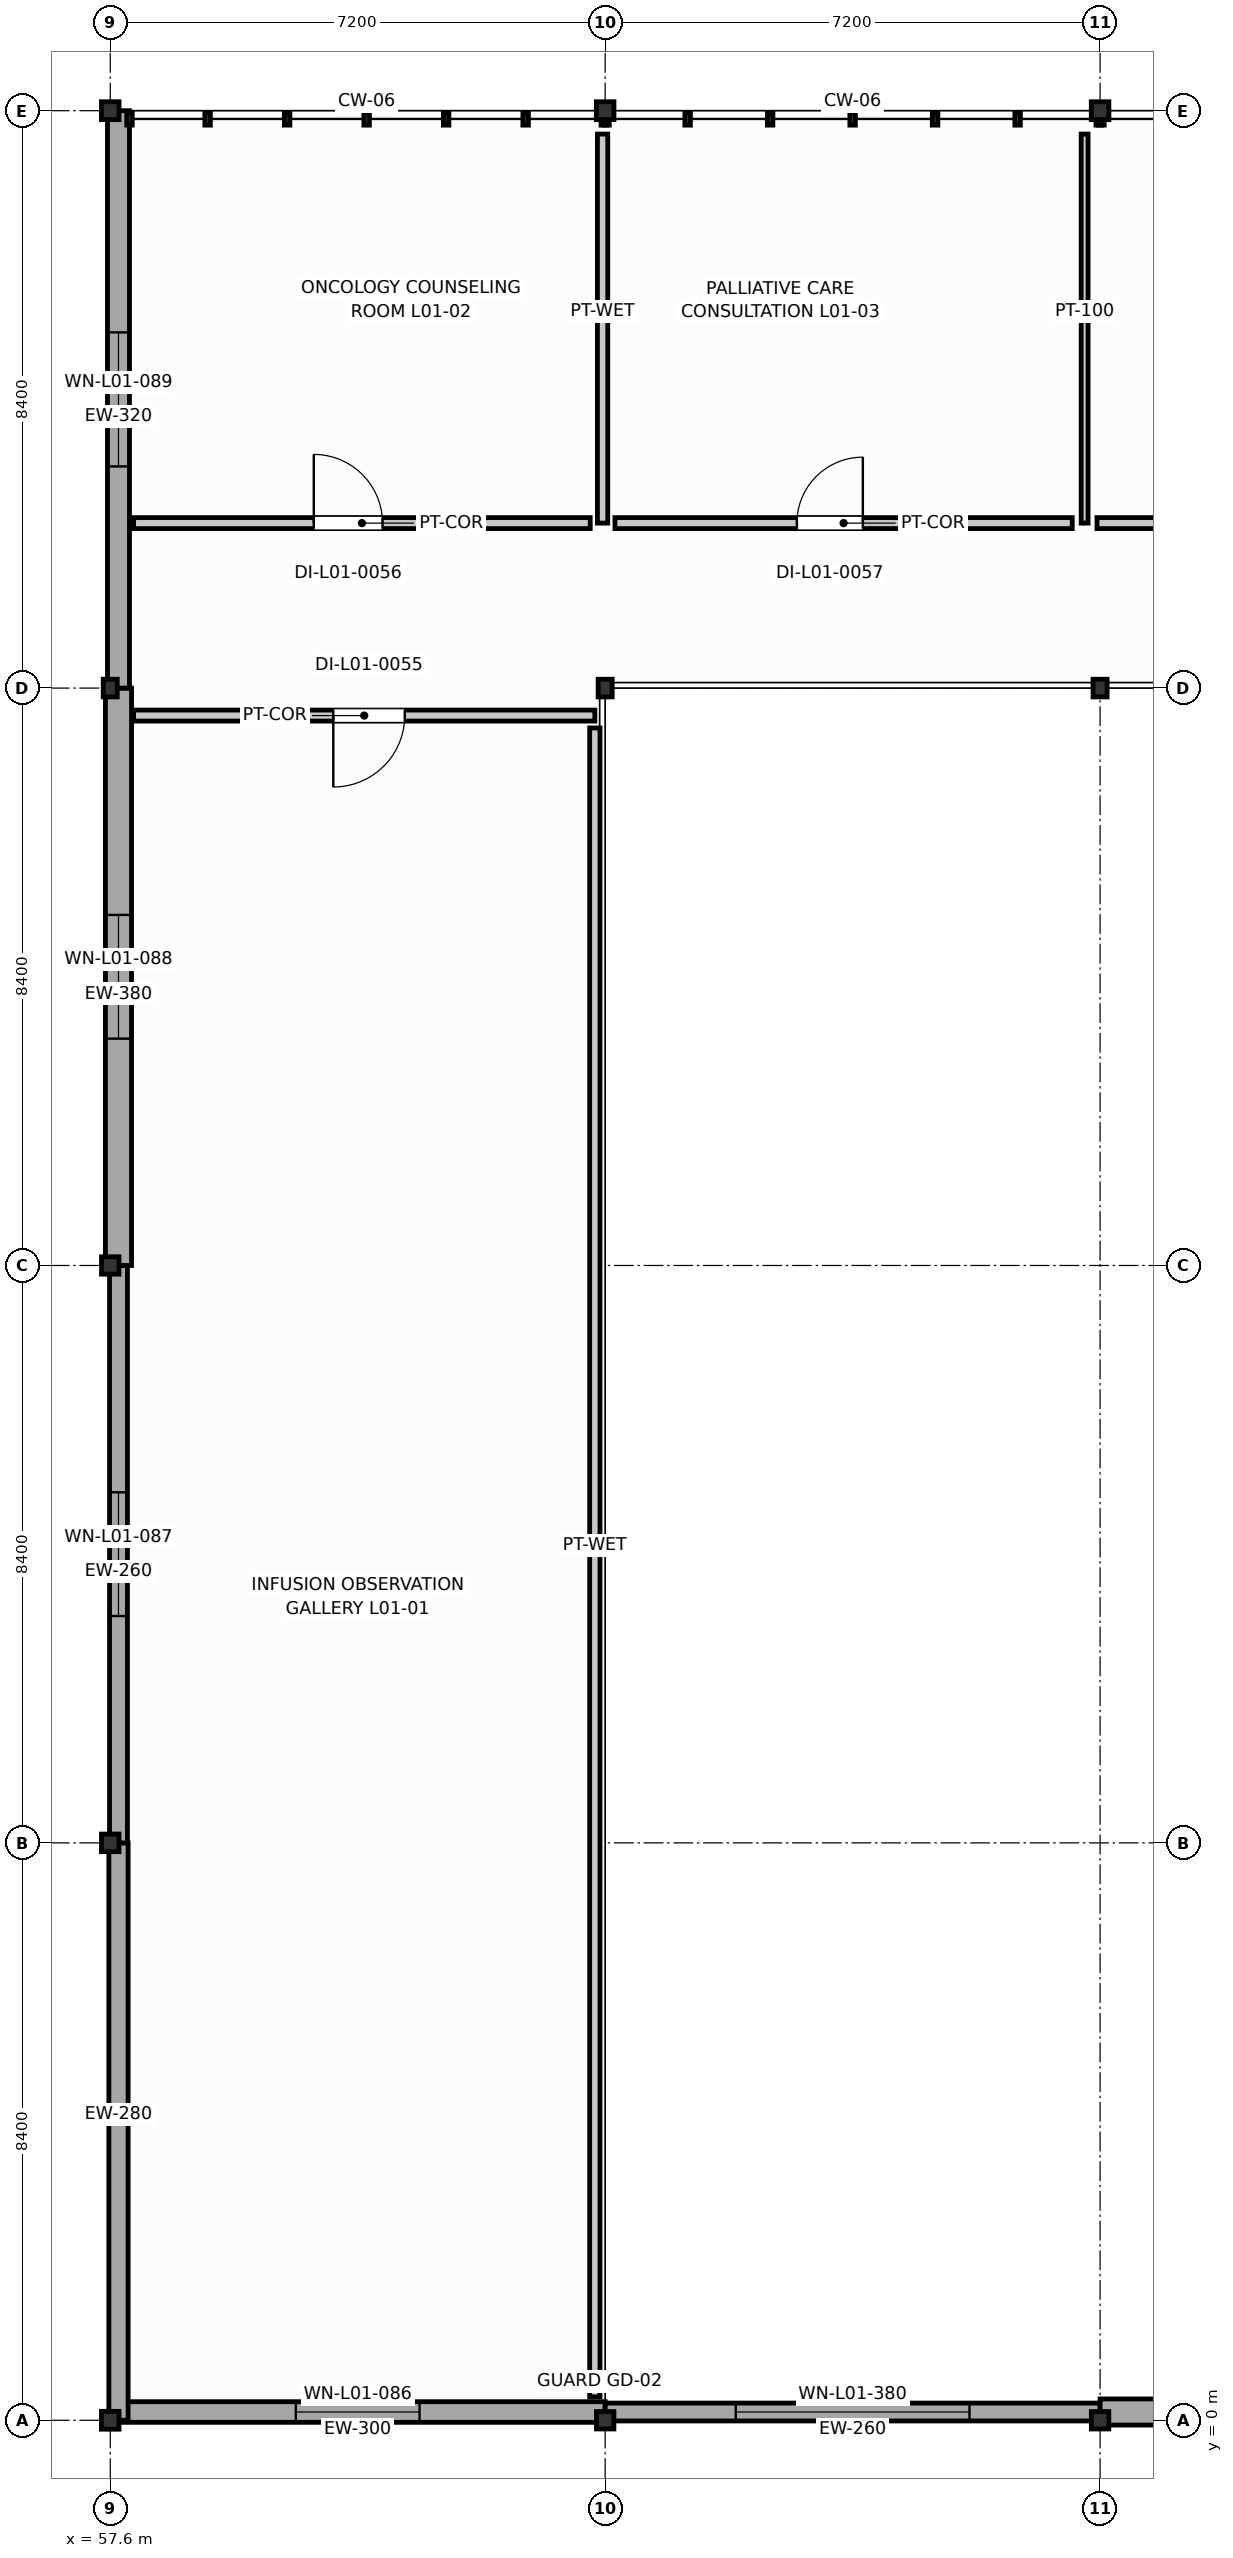
"""IFC4 building model, lengths in metres.
Left out: names, types, materials, properties, quantities, classifications, styles, units other than length and angle.
Written with IfcOpenShell. Run it as: python <this file> out.ifc"""

import sys

from ifc_helpers import new_model, si_unit, direction, frame, frame_2d, origin, origin_2d, place, context, subcontext, project, spatial, rectangle, i_section, extrude, element, fill, save


model = new_model("IFC4")
c1 = context("Model", 3, precision=1e-05, world=origin(), true_north=direction((0.0, 1.0)))
c2 = subcontext(c1, "Body", "Model", "MODEL_VIEW")
j1 = project(units=[si_unit("LENGTHUNIT", "METRE"), si_unit("PLANEANGLEUNIT", "RADIAN")], contexts=[c1])
p1 = place(None, origin())
s1 = spatial("IfcSite", under=j1, at=p1, CompositionType="ELEMENT")
p2 = place(p1, origin())
s2 = spatial("IfcBuilding", under=s1, at=p2, CompositionType="ELEMENT")
p3 = place(p2, frame((0.0, 0.0, 4.8)))
s3 = spatial("IfcBuildingStorey", under=s2, at=p3, CompositionType="ELEMENT", Elevation=4.8)
p4 = place(p3, frame((57.6, 0.0, 0.0), z_axis=(0.0, 0.0, 1.0), x_axis=(1.0, 0.0, 0.0)))
e1 = element("IfcColumn", 1, at=p4, inside=s3, PredefinedType="COLUMN", context=c2, shape_type="SweptSolid", body=[
    extrude(i_section(OverallWidth=0.256, OverallDepth=0.26, WebThickness=0.011, FlangeThickness=0.017, FilletRadius=0.013, at=origin_2d()), origin(), (0.0, 0.0, 1.0), 4.2),
])
p5 = place(p3, frame((57.6, 8.4, 0.0), z_axis=(0.0, 0.0, 1.0), x_axis=(1.0, 0.0, 0.0)))
e2 = element("IfcColumn", 2, at=p5, inside=s3, PredefinedType="COLUMN", context=c2, shape_type="SweptSolid", body=[
    extrude(i_section(OverallWidth=0.255, OverallDepth=0.256, WebThickness=0.01, FlangeThickness=0.016, FilletRadius=0.013, at=origin_2d()), origin(), (0.0, 0.0, 1.0), 4.2),
])
p6 = place(p3, frame((57.6, 16.8, 0.0), z_axis=(0.0, 0.0, 1.0), x_axis=(1.0, 0.0, 0.0)))
e3 = element("IfcColumn", 3, at=p6, inside=s3, PredefinedType="COLUMN", context=c2, shape_type="SweptSolid", body=[
    extrude(i_section(OverallWidth=0.254, OverallDepth=0.253, WebThickness=0.009, FlangeThickness=0.014, FilletRadius=0.013, at=origin_2d()), origin(), (0.0, 0.0, 1.0), 4.2),
])
p7 = place(p3, frame((57.6, 25.2, 0.0), z_axis=(0.0, 0.0, 1.0), x_axis=(1.0, 0.0, 0.0)))
e4 = element("IfcColumn", 4, at=p7, inside=s3, PredefinedType="COLUMN", context=c2, shape_type="SweptSolid", body=[
    extrude(i_section(OverallWidth=0.204, OverallDepth=0.257, WebThickness=0.009, FlangeThickness=0.016, FilletRadius=0.013, at=origin_2d()), origin(), (0.0, 0.0, 1.0), 4.2),
])
p8 = place(p3, frame((57.6, 33.6, 0.0), z_axis=(0.0, 0.0, 1.0), x_axis=(1.0, 0.0, 0.0)))
e5 = element("IfcColumn", 5, at=p8, inside=s3, PredefinedType="COLUMN", context=c2, shape_type="SweptSolid", body=[
    extrude(i_section(OverallWidth=0.256, OverallDepth=0.26, WebThickness=0.011, FlangeThickness=0.017, FilletRadius=0.013, at=origin_2d()), origin(), (0.0, 0.0, 1.0), 4.2),
])
p9 = place(p3, frame((64.8, 0.0, 0.0), z_axis=(0.0, 0.0, 1.0), x_axis=(1.0, 0.0, 0.0)))
e6 = element("IfcColumn", 6, at=p9, inside=s3, PredefinedType="COLUMN", context=c2, shape_type="SweptSolid", body=[
    extrude(i_section(OverallWidth=0.254, OverallDepth=0.253, WebThickness=0.009, FlangeThickness=0.014, FilletRadius=0.013, at=origin_2d()), origin(), (0.0, 0.0, 1.0), 4.2),
])
p10 = place(p3, frame((64.8, 25.2, 0.0), z_axis=(0.0, 0.0, 1.0), x_axis=(1.0, 0.0, 0.0)))
e7 = element("IfcColumn", 7, at=p10, inside=s3, PredefinedType="COLUMN", context=c2, shape_type="SweptSolid", body=[
    extrude(i_section(OverallWidth=0.204, OverallDepth=0.257, WebThickness=0.009, FlangeThickness=0.016, FilletRadius=0.013, at=origin_2d()), origin(), (0.0, 0.0, 1.0), 4.2),
])
p11 = place(p3, frame((64.8, 33.6, 0.0), z_axis=(0.0, 0.0, 1.0), x_axis=(1.0, 0.0, 0.0)))
e8 = element("IfcColumn", 8, at=p11, inside=s3, PredefinedType="COLUMN", context=c2, shape_type="SweptSolid", body=[
    extrude(i_section(OverallWidth=0.256, OverallDepth=0.26, WebThickness=0.011, FlangeThickness=0.017, FilletRadius=0.013, at=origin_2d()), origin(), (0.0, 0.0, 1.0), 4.2),
])
p12 = place(p3, frame((72.0, 0.0, 0.0), z_axis=(0.0, 0.0, 1.0), x_axis=(1.0, 0.0, 0.0)))
e9 = element("IfcColumn", 9, at=p12, inside=s3, PredefinedType="COLUMN", context=c2, shape_type="SweptSolid", body=[
    extrude(i_section(OverallWidth=0.254, OverallDepth=0.253, WebThickness=0.009, FlangeThickness=0.014, FilletRadius=0.013, at=origin_2d()), origin(), (0.0, 0.0, 1.0), 4.2),
])
p13 = place(p3, frame((72.0, 25.2, 0.0), z_axis=(0.0, 0.0, 1.0), x_axis=(1.0, 0.0, 0.0)))
e10 = element("IfcColumn", 10, at=p13, inside=s3, PredefinedType="COLUMN", context=c2, shape_type="SweptSolid", body=[
    extrude(i_section(OverallWidth=0.204, OverallDepth=0.257, WebThickness=0.009, FlangeThickness=0.016, FilletRadius=0.013, at=origin_2d()), origin(), (0.0, 0.0, 1.0), 4.2),
])
p14 = place(p3, frame((72.0, 33.6, 0.0), z_axis=(0.0, 0.0, 1.0), x_axis=(1.0, 0.0, 0.0)))
e11 = element("IfcColumn", 11, at=p14, inside=s3, PredefinedType="COLUMN", context=c2, shape_type="SweptSolid", body=[
    extrude(i_section(OverallWidth=0.256, OverallDepth=0.26, WebThickness=0.011, FlangeThickness=0.017, FilletRadius=0.013, at=origin_2d()), origin(), (0.0, 0.0, 1.0), 4.2),
])
p15 = place(p3, frame((57.6, 0.12, 0.0), z_axis=(0.0, 0.0, 1.0), x_axis=(1.0, 0.0, 0.0)))
e12 = element("IfcWall", 12, at=p15, inside=s3, PredefinedType="SOLIDWALL", context=c2, shape_type="SweptSolid", body=[
    extrude(rectangle(XDim=7.2, YDim=0.3, at=frame_2d((3.6, 0.0))), origin(), (0.0, 0.0, 1.0), 3.482),
])
p16 = place(p15, frame((2.7, 0.0, 0.95)))
e13 = element("IfcOpeningElement", 13, at=p16, cuts=e12, PredefinedType="OPENING", context=c2, shape_type="SweptSolid", body=[
    extrude(rectangle(XDim=1.8, YDim=1.35, at=frame_2d((0.9, 0.675))), frame((0.0, 0.16, 0.0), z_axis=(0.0, -1.0, 0.0), x_axis=(1.0, 0.0, 0.0)), (0.0, 0.0, 1.0), 0.32),
])
p17 = place(p3, frame((57.72, 0.0, 0.0), z_axis=(0.0, 0.0, 1.0), x_axis=(0.0, 1.0, 0.0)))
e14 = element("IfcWall", 14, at=p17, inside=s3, PredefinedType="SOLIDWALL", context=c2, shape_type="SweptSolid", body=[
    extrude(rectangle(XDim=8.4, YDim=0.28, at=frame_2d((4.2, 0.0))), origin(), (0.0, 0.0, 1.0), 3.476),
])
p18 = place(p3, frame((57.72, 8.4, 0.0), z_axis=(0.0, 0.0, 1.0), x_axis=(0.0, 1.0, 0.0)))
e15 = element("IfcWall", 15, at=p18, inside=s3, PredefinedType="SOLIDWALL", context=c2, shape_type="SweptSolid", body=[
    extrude(rectangle(XDim=8.4, YDim=0.26, at=frame_2d((4.2, 0.0))), origin(), (0.0, 0.0, 1.0), 3.476),
])
p19 = place(p18, frame((3.3, 0.0, 0.95)))
e16 = element("IfcOpeningElement", 16, at=p19, cuts=e15, PredefinedType="OPENING", context=c2, shape_type="SweptSolid", body=[
    extrude(rectangle(XDim=1.8, YDim=1.55, at=frame_2d((0.9, 0.775))), frame((0.0, 0.14, 0.0), z_axis=(0.0, -1.0, 0.0), x_axis=(1.0, 0.0, 0.0)), (0.0, 0.0, 1.0), 0.28),
])
p20 = place(p3, frame((57.72, 16.8, 0.0), z_axis=(0.0, 0.0, 1.0), x_axis=(0.0, 1.0, 0.0)))
e17 = element("IfcWall", 17, at=p20, inside=s3, PredefinedType="SOLIDWALL", context=c2, shape_type="SweptSolid", body=[
    extrude(rectangle(XDim=8.4, YDim=0.38, at=frame_2d((4.2, 0.0))), origin(), (0.0, 0.0, 1.0), 3.482),
])
p21 = place(p20, frame((3.3, 0.0, 0.95)))
e18 = element("IfcOpeningElement", 18, at=p21, cuts=e17, PredefinedType="OPENING", context=c2, shape_type="SweptSolid", body=[
    extrude(rectangle(XDim=1.8, YDim=1.75, at=frame_2d((0.9, 0.875))), frame((0.0, 0.2, 0.0), z_axis=(0.0, -1.0, 0.0), x_axis=(1.0, 0.0, 0.0)), (0.0, 0.0, 1.0), 0.4),
])
p22 = place(p3, frame((57.72, 25.2, 0.0), z_axis=(0.0, 0.0, 1.0), x_axis=(0.0, 1.0, 0.0)))
e19 = element("IfcWall", 19, at=p22, inside=s3, PredefinedType="SOLIDWALL", context=c2, shape_type="SweptSolid", body=[
    extrude(rectangle(XDim=8.4, YDim=0.32, at=frame_2d((4.2, 0.0))), origin(), (0.0, 0.0, 1.0), 3.529),
])
p23 = place(p22, frame((3.225, 0.0, 0.95)))
e20 = element("IfcOpeningElement", 20, at=p23, cuts=e19, PredefinedType="OPENING", context=c2, shape_type="SweptSolid", body=[
    extrude(rectangle(XDim=1.95, YDim=1.15, at=frame_2d((0.975, 0.575))), frame((0.0, 0.17, 0.0), z_axis=(0.0, -1.0, 0.0), x_axis=(1.0, 0.0, 0.0)), (0.0, 0.0, 1.0), 0.34),
])
p24 = place(p3, frame((64.8, 0.12, 0.0), z_axis=(0.0, 0.0, 1.0), x_axis=(1.0, 0.0, 0.0)))
e21 = element("IfcWall", 21, at=p24, inside=s3, PredefinedType="SOLIDWALL", context=c2, shape_type="SweptSolid", body=[
    extrude(rectangle(XDim=7.2, YDim=0.26, at=frame_2d((3.6, 0.0))), origin(), (0.0, 0.0, 1.0), 3.482),
])
p25 = place(p24, frame((1.9, 0.0, 0.95)))
e22 = element("IfcOpeningElement", 22, at=p25, cuts=e21, PredefinedType="OPENING", context=c2, shape_type="SweptSolid", body=[
    extrude(rectangle(XDim=3.4, YDim=1.75, at=frame_2d((1.7, 0.875))), frame((0.0, 0.14, 0.0), z_axis=(0.0, -1.0, 0.0), x_axis=(1.0, 0.0, 0.0)), (0.0, 0.0, 1.0), 0.28),
])
p26 = place(p3, frame((72.0, 0.12, 0.0), z_axis=(0.0, 0.0, 1.0), x_axis=(1.0, 0.0, 0.0)))
e23 = element("IfcWall", 23, at=p26, inside=s3, PredefinedType="SOLIDWALL", context=c2, shape_type="SweptSolid", body=[
    extrude(rectangle(XDim=7.2, YDim=0.38, at=frame_2d((3.6, 0.0))), origin(), (0.0, 0.0, 1.0), 3.482),
])
p27 = place(p26, frame((3.15, 0.0, 0.95)))
e24 = element("IfcOpeningElement", 24, at=p27, cuts=e23, PredefinedType="OPENING", context=c2, shape_type="SweptSolid", body=[
    extrude(rectangle(XDim=0.9, YDim=1.15, at=frame_2d((0.45, 0.575))), frame((0.0, 0.2, 0.0), z_axis=(0.0, -1.0, 0.0), x_axis=(1.0, 0.0, 0.0)), (0.0, 0.0, 1.0), 0.4),
])
p28 = place(p3, frame((57.94, 24.8, 0.0), z_axis=(0.0, 0.0, 1.0), x_axis=(1.0, 0.0, 0.0)))
e25 = element("IfcWall", 25, at=p28, inside=s3, PredefinedType="PARTITIONING", context=c2, shape_type="SweptSolid", body=[
    extrude(rectangle(XDim=6.71, YDim=0.16, at=frame_2d((3.355, 0.0))), origin(), (0.0, 0.0, 1.0), 3.945),
])
p29 = place(p28, frame((2.905, 0.0, 0.0)))
e26 = element("IfcOpeningElement", 26, at=p29, cuts=e25, PredefinedType="OPENING", context=c2, shape_type="SweptSolid", body=[
    extrude(rectangle(XDim=1.04, YDim=2.15, at=frame_2d((0.52, 1.075))), frame((0.0, 0.09, 0.0), z_axis=(0.0, -1.0, 0.0), x_axis=(1.0, 0.0, 0.0)), (0.0, 0.0, 1.0), 0.18),
])
p30 = place(p3, frame((64.65, 24.62, 0.0), z_axis=(0.0, 0.0, 1.0), x_axis=(0.0, -1.0, 0.0)))
e27 = element("IfcWall", 27, at=p30, inside=s3, PredefinedType="PLUMBINGWALL", context=c2, shape_type="SweptSolid", body=[
    extrude(rectangle(XDim=24.28, YDim=0.15, at=frame_2d((12.14, 0.0))), origin(), (0.0, 0.0, 1.0), 3.945),
])
p31 = place(p3, frame((64.762, 33.26, 0.0), z_axis=(0.0, 0.0, 1.0), x_axis=(0.0, -1.0, 0.0)))
e28 = element("IfcWall", 28, at=p31, inside=s3, PredefinedType="PLUMBINGWALL", context=c2, shape_type="SweptSolid", body=[
    extrude(rectangle(XDim=5.66, YDim=0.15, at=frame_2d((2.83, 0.0))), origin(), (0.0, 0.0, 1.0), 3.328),
])
p32 = place(p3, frame((64.583, 27.6, 0.0), z_axis=(0.0, 0.0, 1.0), x_axis=(-1.0, 0.0, 0.0)))
e29 = element("IfcWall", 29, at=p32, inside=s3, PredefinedType="PARTITIONING", context=c2, shape_type="SweptSolid", body=[
    extrude(rectangle(XDim=6.643, YDim=0.16, at=frame_2d((3.321, 0.0))), origin(), (0.0, 0.0, 1.0), 3.328),
])
p33 = place(p32, frame((3.021, 0.0, 0.0)))
e30 = element("IfcOpeningElement", 30, at=p33, cuts=e29, PredefinedType="OPENING", context=c2, shape_type="SweptSolid", body=[
    extrude(rectangle(XDim=1.0, YDim=2.15, at=frame_2d((0.5, 1.075))), frame((0.0, 0.09, 0.0), z_axis=(0.0, -1.0, 0.0), x_axis=(1.0, 0.0, 0.0)), (0.0, 0.0, 1.0), 0.18),
])
p34 = place(p3, frame((71.775, 33.26, 0.0), z_axis=(0.0, 0.0, 1.0), x_axis=(0.0, -1.0, 0.0)))
e31 = element("IfcWall", 31, at=p34, inside=s3, PredefinedType="PARTITIONING", context=c2, shape_type="SweptSolid", body=[
    extrude(rectangle(XDim=5.66, YDim=0.1, at=frame_2d((2.83, 0.0))), origin(), (0.0, 0.0, 1.0), 3.485),
])
p35 = place(p3, frame((71.595, 27.6, 0.0), z_axis=(0.0, 0.0, 1.0), x_axis=(-1.0, 0.0, 0.0)))
e32 = element("IfcWall", 32, at=p35, inside=s3, PredefinedType="PARTITIONING", context=c2, shape_type="SweptSolid", body=[
    extrude(rectangle(XDim=6.653, YDim=0.16, at=frame_2d((3.326, 0.0))), origin(), (0.0, 0.0, 1.0), 3.328),
])
p36 = place(p35, frame((3.046, 0.0, 0.0)))
e33 = element("IfcOpeningElement", 33, at=p36, cuts=e32, PredefinedType="OPENING", context=c2, shape_type="SweptSolid", body=[
    extrude(rectangle(XDim=0.96, YDim=2.1, at=frame_2d((0.48, 1.05))), frame((0.0, 0.09, 0.0), z_axis=(0.0, -1.0, 0.0), x_axis=(1.0, 0.0, 0.0)), (0.0, 0.0, 1.0), 0.18),
])
p37 = place(p3, frame((78.607, 27.6, 0.0), z_axis=(0.0, 0.0, 1.0), x_axis=(-1.0, 0.0, 0.0)))
e34 = element("IfcWall", 34, at=p37, inside=s3, PredefinedType="PARTITIONING", context=c2, shape_type="SweptSolid", body=[
    extrude(rectangle(XDim=6.652, YDim=0.16, at=frame_2d((3.326, 0.0))), origin(), (0.0, 0.0, 1.0), 3.485),
])
p38 = place(p37, frame((3.066, 0.0, 0.0)))
e35 = element("IfcOpeningElement", 35, at=p38, cuts=e34, PredefinedType="OPENING", context=c2, shape_type="SweptSolid", body=[
    extrude(rectangle(XDim=0.92, YDim=2.1, at=frame_2d((0.46, 1.05))), frame((0.0, 0.09, 0.0), z_axis=(0.0, -1.0, 0.0), x_axis=(1.0, 0.0, 0.0)), (0.0, 0.0, 1.0), 0.18),
])
p39 = place(p16, origin())
e36 = element("IfcWindow", 36, at=p39, inside=s3, PartitioningType="SINGLE_PANEL", PredefinedType="WINDOW", context=c2, shape_type="SweptSolid", body=[
    extrude(rectangle(XDim=1.8, YDim=1.35, at=frame_2d((0.9, 0.675))), frame((0.0, 0.03, 0.0), z_axis=(0.0, -1.0, 0.0), x_axis=(1.0, 0.0, 0.0)), (0.0, 0.0, 1.0), 0.06),
])
fill(e13, e36)
p40 = place(p19, origin())
e37 = element("IfcWindow", 37, at=p40, inside=s3, PartitioningType="SINGLE_PANEL", PredefinedType="WINDOW", context=c2, shape_type="SweptSolid", body=[
    extrude(rectangle(XDim=1.8, YDim=1.55, at=frame_2d((0.9, 0.775))), frame((0.0, 0.03, 0.0), z_axis=(0.0, -1.0, 0.0), x_axis=(1.0, 0.0, 0.0)), (0.0, 0.0, 1.0), 0.06),
])
fill(e16, e37)
p41 = place(p21, origin())
e38 = element("IfcWindow", 38, at=p41, inside=s3, PartitioningType="SINGLE_PANEL", PredefinedType="WINDOW", context=c2, shape_type="SweptSolid", body=[
    extrude(rectangle(XDim=1.8, YDim=1.75, at=frame_2d((0.9, 0.875))), frame((0.0, 0.03, 0.0), z_axis=(0.0, -1.0, 0.0), x_axis=(1.0, 0.0, 0.0)), (0.0, 0.0, 1.0), 0.06),
])
fill(e18, e38)
p42 = place(p23, origin())
e39 = element("IfcWindow", 39, at=p42, inside=s3, PartitioningType="SINGLE_PANEL", PredefinedType="WINDOW", context=c2, shape_type="SweptSolid", body=[
    extrude(rectangle(XDim=1.95, YDim=1.15, at=frame_2d((0.975, 0.575))), frame((0.0, 0.03, 0.0), z_axis=(0.0, -1.0, 0.0), x_axis=(1.0, 0.0, 0.0)), (0.0, 0.0, 1.0), 0.06),
])
fill(e20, e39)
p43 = place(p25, origin())
e40 = element("IfcWindow", 40, at=p43, inside=s3, PartitioningType="SINGLE_PANEL", PredefinedType="WINDOW", context=c2, shape_type="SweptSolid", body=[
    extrude(rectangle(XDim=3.4, YDim=1.75, at=frame_2d((1.7, 0.875))), frame((0.0, 0.03, 0.0), z_axis=(0.0, -1.0, 0.0), x_axis=(1.0, 0.0, 0.0)), (0.0, 0.0, 1.0), 0.06),
])
fill(e22, e40)
p44 = place(p29, frame((1.04, 0.0, 0.0), z_axis=(0.0, 0.0, 1.0), x_axis=(-1.0, 0.0, 0.0)))
e41 = element("IfcDoor", 41, at=p44, inside=s3, OperationType="SINGLE_SWING_RIGHT", PredefinedType="DOOR", context=c2, shape_type="SweptSolid", body=[
    extrude(rectangle(XDim=1.04, YDim=2.15, at=frame_2d((0.52, 1.075))), frame((0.0, 0.025, 0.0), z_axis=(0.0, -1.0, 0.0), x_axis=(1.0, 0.0, 0.0)), (0.0, 0.0, 1.0), 0.05),
])
fill(e26, e41)
p45 = place(p33, frame((1.0, 0.0, 0.0), z_axis=(0.0, 0.0, 1.0), x_axis=(-1.0, 0.0, 0.0)))
e42 = element("IfcDoor", 42, at=p45, inside=s3, OperationType="SINGLE_SWING_LEFT", PredefinedType="DOOR", context=c2, shape_type="SweptSolid", body=[
    extrude(rectangle(XDim=1.0, YDim=2.15, at=frame_2d((0.5, 1.075))), frame((0.0, 0.025, 0.0), z_axis=(0.0, -1.0, 0.0), x_axis=(1.0, 0.0, 0.0)), (0.0, 0.0, 1.0), 0.05),
])
fill(e30, e42)
p46 = place(p36, frame((0.96, 0.0, 0.0), z_axis=(0.0, 0.0, 1.0), x_axis=(-1.0, 0.0, 0.0)))
e43 = element("IfcDoor", 43, at=p46, inside=s3, OperationType="SINGLE_SWING_RIGHT", PredefinedType="DOOR", context=c2, shape_type="SweptSolid", body=[
    extrude(rectangle(XDim=0.96, YDim=2.1, at=frame_2d((0.48, 1.05))), frame((0.0, 0.025, 0.0), z_axis=(0.0, -1.0, 0.0), x_axis=(1.0, 0.0, 0.0)), (0.0, 0.0, 1.0), 0.05),
])
fill(e33, e43)
save(model, sys.argv[1])
